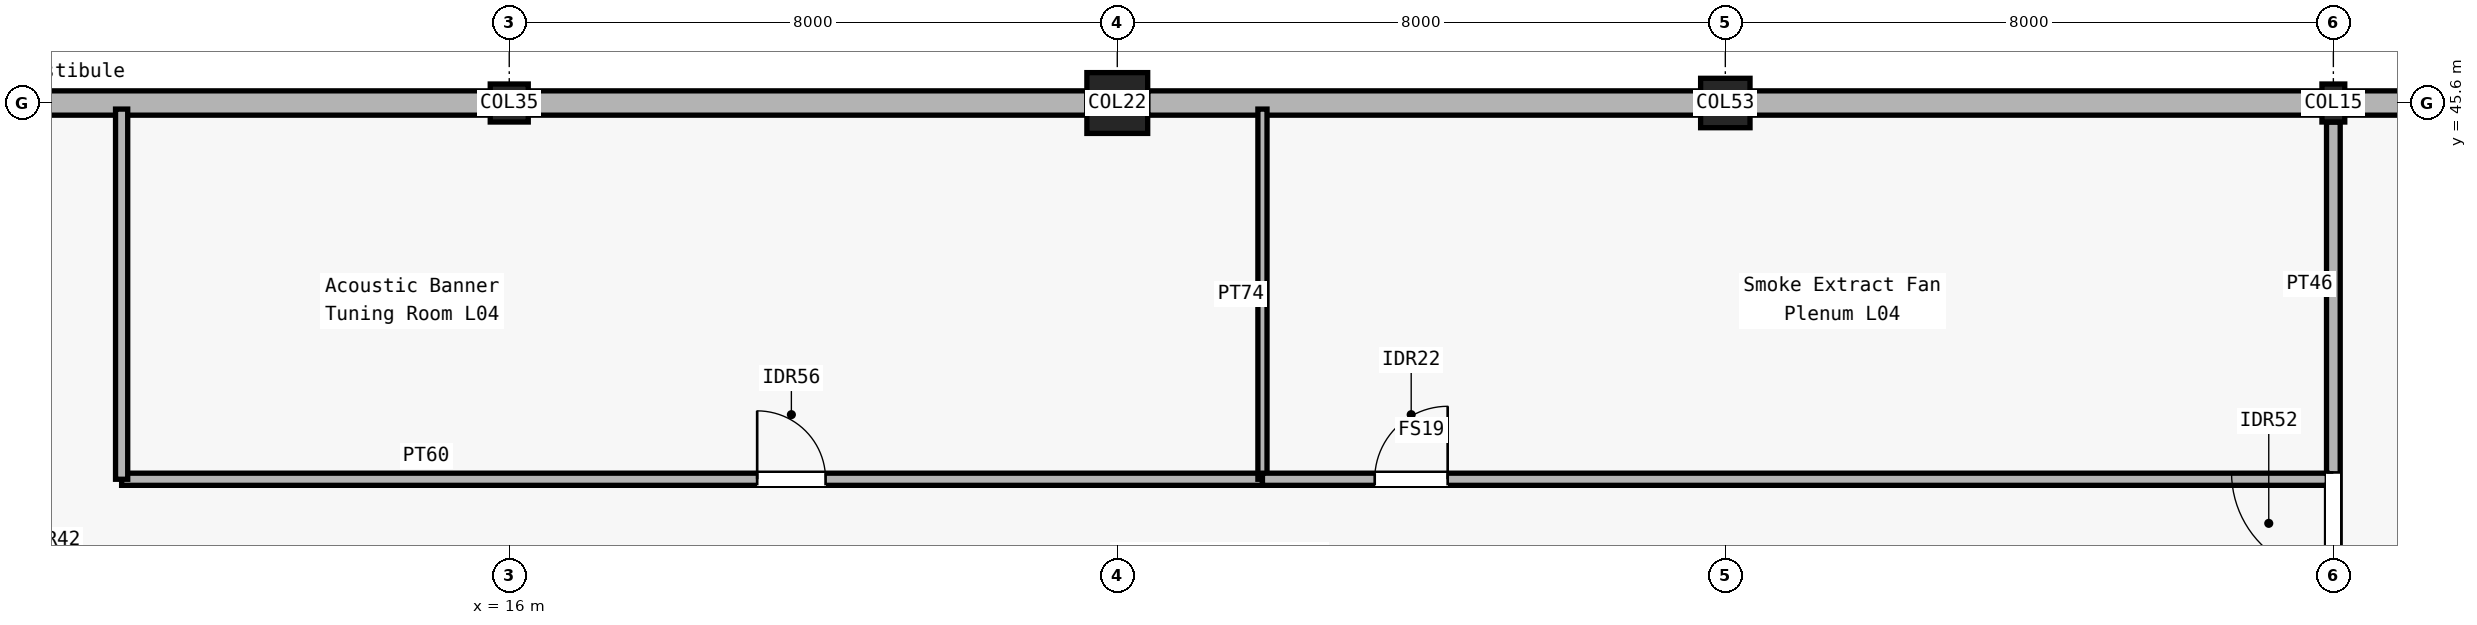
"""IFC4 building model, lengths in metres.
Left out: names, types, materials, properties, quantities, classifications, styles, units other than length and angle.
Written with IfcOpenShell. Run it as: python <this file> out.ifc"""

import sys

from ifc_helpers import new_model, si_unit, direction, frame, frame_2d, origin, origin_2d, place, context, subcontext, project, spatial, rectangle, circle, i_section, extrude, element, fill, save


model = new_model("IFC4")
c1 = context("Model", 3, precision=1e-05, world=origin(), true_north=direction((0.0, 1.0)))
c2 = subcontext(c1, "Body", "Model", "MODEL_VIEW")
j1 = project(units=[si_unit("LENGTHUNIT", "METRE"), si_unit("PLANEANGLEUNIT", "RADIAN")], contexts=[c1])
p1 = place(None, origin())
s1 = spatial("IfcSite", under=j1, at=p1, CompositionType="ELEMENT")
p2 = place(p1, origin())
s2 = spatial("IfcBuilding", under=s1, at=p2, CompositionType="ELEMENT")
p3 = place(p2, frame((0.0, 0.0, 19.8)))
s3 = spatial("IfcBuildingStorey", under=s2, at=p3, CompositionType="ELEMENT", Elevation=19.8)
p4 = place(p3, frame((16.0, 45.6, 0.0), z_axis=(0.0, 0.0, 1.0), x_axis=(1.0, 0.0, 0.0)))
e1 = element("IfcColumn", 1, at=p4, inside=s3, PredefinedType="COLUMN", context=c2, shape_type="SweptSolid", body=[
    extrude(rectangle(XDim=0.5, YDim=0.5, at=origin_2d()), origin(), (0.0, 0.0, 1.0), 7.0),
])
p5 = place(p3, frame((24.0, 45.6, 0.0), z_axis=(0.0, 0.0, 1.0), x_axis=(1.0, 0.0, 0.0)))
e2 = element("IfcColumn", 2, at=p5, inside=s3, PredefinedType="COLUMN", context=c2, shape_type="SweptSolid", body=[
    extrude(circle(Radius=0.4, at=origin_2d()), origin(), (0.0, 0.0, 1.0), 7.0),
])
p6 = place(p3, frame((32.0, 45.6, 0.0), z_axis=(0.0, 0.0, 1.0), x_axis=(1.0, 0.0, 0.0)))
e3 = element("IfcColumn", 3, at=p6, inside=s3, PredefinedType="COLUMN", context=c2, shape_type="SweptSolid", body=[
    extrude(circle(Radius=0.325, at=origin_2d()), origin(), (0.0, 0.0, 1.0), 7.0),
])
p7 = place(p3, frame((40.0, 45.6, 0.0), z_axis=(0.0, 0.0, 1.0), x_axis=(1.0, 0.0, 0.0)))
e4 = element("IfcColumn", 4, at=p7, inside=s3, PredefinedType="COLUMN", context=c2, shape_type="SweptSolid", body=[
    extrude(i_section(OverallWidth=0.3, OverallDepth=0.5, WebThickness=0.014, FlangeThickness=0.028, FilletRadius=0.027, at=origin_2d()), origin(), (0.0, 0.0, 1.0), 7.0),
])
p8 = place(p3, frame((8.3, 45.6, 0.0), z_axis=(0.0, 0.0, 1.0), x_axis=(1.0, 0.0, 0.0)))
e5 = element("IfcWall", 5, at=p8, inside=s3, PredefinedType="SOLIDWALL", context=c2, shape_type="SweptSolid", body=[
    extrude(rectangle(XDim=7.45, YDim=0.32, at=frame_2d((3.725, 0.0))), origin(), (0.0, 0.0, 1.0), 6.05),
])
p9 = place(p3, frame((16.25, 45.6, 0.0), z_axis=(0.0, 0.0, 1.0), x_axis=(1.0, 0.0, 0.0)))
e6 = element("IfcWall", 6, at=p9, inside=s3, PredefinedType="SOLIDWALL", context=c2, shape_type="SweptSolid", body=[
    extrude(rectangle(XDim=7.35, YDim=0.32, at=frame_2d((3.675, 0.0))), origin(), (0.0, 0.0, 1.0), 6.05),
])
p10 = place(p3, frame((24.4, 45.6, 0.0), z_axis=(0.0, 0.0, 1.0), x_axis=(1.0, 0.0, 0.0)))
e7 = element("IfcWall", 7, at=p10, inside=s3, PredefinedType="SOLIDWALL", context=c2, shape_type="SweptSolid", body=[
    extrude(rectangle(XDim=7.275, YDim=0.32, at=frame_2d((3.638, 0.0))), origin(), (0.0, 0.0, 1.0), 6.05),
])
p11 = place(p3, frame((32.325, 45.6, 0.0), z_axis=(0.0, 0.0, 1.0), x_axis=(1.0, 0.0, 0.0)))
e8 = element("IfcWall", 8, at=p11, inside=s3, PredefinedType="SOLIDWALL", context=c2, shape_type="SweptSolid", body=[
    extrude(rectangle(XDim=7.525, YDim=0.32, at=frame_2d((3.763, 0.0))), origin(), (0.0, 0.0, 1.0), 6.05),
])
p12 = place(p3, frame((40.15, 45.6, 0.0), z_axis=(0.0, 0.0, 1.0), x_axis=(1.0, 0.0, 0.0)))
e9 = element("IfcWall", 9, at=p12, inside=s3, PredefinedType="SOLIDWALL", context=c2, shape_type="SweptSolid", body=[
    extrude(rectangle(XDim=9.3, YDim=0.32, at=frame_2d((4.65, 0.0))), origin(), (0.0, 0.0, 1.0), 6.05),
])
p13 = place(p3, frame((40.0, 38.25, 0.0), z_axis=(0.0, 0.0, 1.0), x_axis=(0.0, 1.0, 0.0)))
e10 = element("IfcWall", 10, at=p13, inside=s3, PredefinedType="PARTITIONING", context=c2, shape_type="SweptSolid", body=[
    extrude(rectangle(XDim=7.1, YDim=0.18, at=frame_2d((3.55, 0.0))), origin(), (0.0, 0.0, 1.0), 4.54),
])
p14 = place(p13, frame((1.15, 0.0, 0.0)))
e11 = element("IfcOpeningElement", 11, at=p14, cuts=e10, PredefinedType="OPENING", context=c2, shape_type="SweptSolid", body=[
    extrude(rectangle(XDim=1.34, YDim=2.2, at=frame_2d((0.67, 1.1))), frame((0.0, 0.1, 0.0), z_axis=(0.0, -1.0, 0.0), x_axis=(1.0, 0.0, 0.0)), (0.0, 0.0, 1.0), 0.2),
])
p15 = place(p3, frame((10.9, 40.65, 0.0), z_axis=(0.0, 0.0, 1.0), x_axis=(1.0, 0.0, 0.0)))
e12 = element("IfcWall", 12, at=p15, inside=s3, PredefinedType="PARTITIONING", context=c2, shape_type="SweptSolid", body=[
    extrude(rectangle(XDim=15.01, YDim=0.16, at=frame_2d((7.505, 0.0))), origin(), (0.0, 0.0, 1.0), 4.54),
])
p16 = place(p15, frame((8.362, 0.0, 0.0)))
e13 = element("IfcOpeningElement", 13, at=p16, cuts=e12, PredefinedType="OPENING", context=c2, shape_type="SweptSolid", body=[
    extrude(rectangle(XDim=0.9, YDim=2.1, at=frame_2d((0.45, 1.05))), frame((0.0, 0.09, 0.0), z_axis=(0.0, -1.0, 0.0), x_axis=(1.0, 0.0, 0.0)), (0.0, 0.0, 1.0), 0.18),
])
p17 = place(p3, frame((25.91, 40.65, 0.0), z_axis=(0.0, 0.0, 1.0), x_axis=(0.0, 1.0, 0.0)))
e14 = element("IfcWall", 14, at=p17, inside=s3, PredefinedType="PARTITIONING", context=c2, shape_type="SweptSolid", body=[
    extrude(rectangle(XDim=4.87, YDim=0.12, at=frame_2d((2.435, 0.0))), origin(), (0.0, 0.0, 1.0), 4.54),
])
p18 = place(p3, frame((25.91, 40.65, 0.0), z_axis=(0.0, 0.0, 1.0), x_axis=(1.0, 0.0, 0.0)))
e15 = element("IfcWall", 15, at=p18, inside=s3, PredefinedType="PARTITIONING", context=c2, shape_type="SweptSolid", body=[
    extrude(rectangle(XDim=14.01, YDim=0.16, at=frame_2d((7.005, 0.0))), origin(), (0.0, 0.0, 1.0), 4.54),
])
p19 = place(p18, frame((1.477, 0.0, 0.0)))
e16 = element("IfcOpeningElement", 16, at=p19, cuts=e15, PredefinedType="OPENING", context=c2, shape_type="SweptSolid", body=[
    extrude(rectangle(XDim=0.96, YDim=2.1, at=frame_2d((0.48, 1.05))), frame((0.0, 0.09, 0.0), z_axis=(0.0, -1.0, 0.0), x_axis=(1.0, 0.0, 0.0)), (0.0, 0.0, 1.0), 0.18),
])
p20 = place(p3, frame((10.9, 40.65, 0.0), z_axis=(0.0, 0.0, 1.0), x_axis=(0.0, 1.0, 0.0)))
e17 = element("IfcWall", 17, at=p20, inside=s3, PredefinedType="PARTITIONING", context=c2, shape_type="SweptSolid", body=[
    extrude(rectangle(XDim=4.87, YDim=0.16, at=frame_2d((2.435, 0.0))), origin(), (0.0, 0.0, 1.0), 4.54),
])
p21 = place(p14, origin())
e18 = element("IfcDoor", 18, at=p21, inside=s3, OperationType="SINGLE_SWING_RIGHT", PredefinedType="DOOR", context=c2, shape_type="SweptSolid", body=[
    extrude(rectangle(XDim=1.34, YDim=2.2, at=frame_2d((0.67, 1.1))), frame((0.0, 0.025, 0.0), z_axis=(0.0, -1.0, 0.0), x_axis=(1.0, 0.0, 0.0)), (0.0, 0.0, 1.0), 0.05),
])
fill(e11, e18)
p22 = place(p16, origin())
e19 = element("IfcDoor", 19, at=p22, inside=s3, OperationType="SINGLE_SWING_LEFT", PredefinedType="DOOR", context=c2, shape_type="SweptSolid", body=[
    extrude(rectangle(XDim=0.9, YDim=2.1, at=frame_2d((0.45, 1.05))), frame((0.0, 0.025, 0.0), z_axis=(0.0, -1.0, 0.0), x_axis=(1.0, 0.0, 0.0)), (0.0, 0.0, 1.0), 0.05),
])
fill(e13, e19)
p23 = place(p19, origin())
e20 = element("IfcDoor", 20, at=p23, inside=s3, OperationType="SINGLE_SWING_RIGHT", PredefinedType="DOOR", context=c2, shape_type="SweptSolid", body=[
    extrude(rectangle(XDim=0.96, YDim=2.1, at=frame_2d((0.48, 1.05))), frame((0.0, 0.025, 0.0), z_axis=(0.0, -1.0, 0.0), x_axis=(1.0, 0.0, 0.0)), (0.0, 0.0, 1.0), 0.05),
])
fill(e16, e20)
save(model, sys.argv[1])
